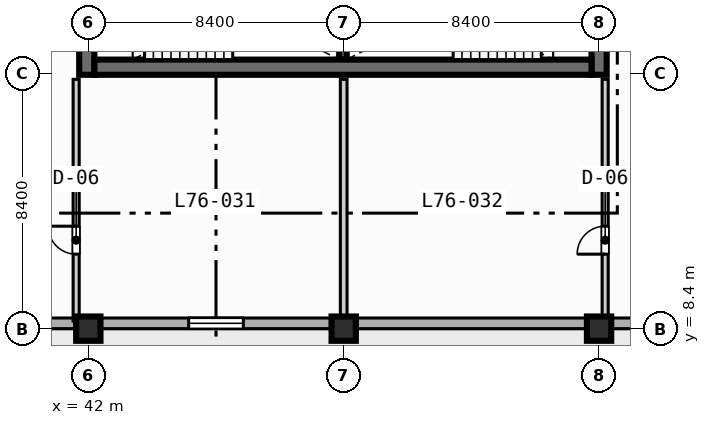
"""IFC4 building model, lengths in metres.
Left out: names, types, materials, properties, quantities, classifications, styles, units other than length and angle.
Written with IfcOpenShell. Run it as: python <this file> out.ifc"""

import sys

from ifc_helpers import new_model, si_unit, direction, frame, frame_2d, origin, origin_2d, place, context, subcontext, project, spatial, rectangle, extrude, element, fill, save


model = new_model("IFC4")
c1 = context("Model", 3, precision=1e-05, world=origin(), true_north=direction((0.0, 1.0)))
c2 = subcontext(c1, "Body", "Model", "MODEL_VIEW")
j1 = project(units=[si_unit("LENGTHUNIT", "METRE"), si_unit("PLANEANGLEUNIT", "RADIAN")], contexts=[c1])
p1 = place(None, origin())
s1 = spatial("IfcSite", under=j1, at=p1, CompositionType="ELEMENT")
p2 = place(p1, origin())
s2 = spatial("IfcBuilding", under=s1, at=p2, CompositionType="ELEMENT")
p3 = place(p2, frame((0.0, 0.0, 308.6)))
s3 = spatial("IfcBuildingStorey", under=s2, at=p3, CompositionType="ELEMENT", Elevation=308.6)
p4 = place(p3, frame((50.375, 17.25, 0.0), z_axis=(0.0, 0.0, 1.0), x_axis=(0.0, 1.0, 0.0)))
e1 = element("IfcWall", 1, at=p4, inside=s3, PredefinedType="SOLIDWALL", context=c2, shape_type="SweptSolid", body=[
    extrude(rectangle(XDim=3.5, YDim=0.25, at=frame_2d((1.75, 0.0))), origin(), (0.0, 0.0, 1.0), 3.67),
])
for number, where, z_axis, x_axis in (
    (2, (41.95, 16.75, 0.0), (0.0, 0.0, 1.0), (0.0, 1.0, 0.0)),
    (3, (58.8, 16.75, 0.0), (0.0, 0.0, 1.0), (0.0, 1.0, 0.0)),
):
    element("IfcWall", number, at=place(p3, frame(where, z_axis=z_axis, x_axis=x_axis)), inside=s3, PredefinedType="SHEAR", context=c2, shape_type="SweptSolid", body=[
        extrude(rectangle(XDim=1.25, YDim=0.5, at=frame_2d((0.625, 0.0))), origin(), (0.0, 0.0, 1.0), 3.67),
    ])
p5 = place(p3, frame((42.2, 17.0, 0.0), z_axis=(0.0, 0.0, 1.0), x_axis=(1.0, 0.0, 0.0)))
e4 = element("IfcWall", 4, at=p5, inside=s3, PredefinedType="SHEAR", context=c2, shape_type="SweptSolid", body=[
    extrude(rectangle(XDim=16.35, YDim=0.5, at=frame_2d((8.175, 0.0))), origin(), (0.0, 0.0, 1.0), 3.67),
])
for number, where, z_axis, x_axis in (
    (5, (42.0, 8.4, 0.0), (0.0, 0.0, 1.0), (1.0, 0.0, 0.0)),
    (6, (50.4, 8.4, 0.0), (0.0, 0.0, 1.0), (1.0, 0.0, 0.0)),
    (7, (58.8, 8.4, 0.0), (0.0, 0.0, 1.0), (1.0, 0.0, 0.0)),
):
    element("IfcColumn", number, at=place(p3, frame(where, z_axis=z_axis, x_axis=x_axis)), inside=s3, PredefinedType="COLUMN", context=c2, shape_type="SweptSolid", body=[
        extrude(rectangle(XDim=0.8, YDim=0.8, at=origin_2d()), origin(), (0.0, 0.0, 1.0), 3.9),
    ])
p6 = place(p3, frame((64.025, 8.575, 0.0), z_axis=(0.0, 0.0, 1.0), x_axis=(-1.0, 0.0, 0.0)))
e8 = element("IfcWall", 8, at=p6, inside=s3, PredefinedType="STANDARD", context=c2, shape_type="SweptSolid", body=[
    extrude(rectangle(XDim=52.45, YDim=0.35, at=frame_2d((26.225, 0.0))), origin(), (0.0, 0.0, 1.0), 3.67),
])
p7 = place(p6, frame((34.925, 0.0, 0.0)))
e9 = element("IfcOpeningElement", 9, at=p7, cuts=e8, PredefinedType="OPENING", context=c2, shape_type="SweptSolid", body=[
    extrude(rectangle(XDim=1.4, YDim=2.2, at=frame_2d((0.7, 1.1))), frame((0.0, 0.185, 0.0), z_axis=(0.0, -1.0, 0.0), x_axis=(1.0, 0.0, 0.0)), (0.0, 0.0, 1.0), 0.37),
])
p8 = place(p6, frame((25.025, 0.0, 0.85)))
e10 = element("IfcOpeningElement", 10, at=p8, cuts=e8, PredefinedType="OPENING", context=c2, shape_type="SweptSolid", body=[
    extrude(rectangle(XDim=2.4, YDim=1.95, at=frame_2d((1.2, 0.975))), frame((0.0, 0.185, 0.0), z_axis=(0.0, -1.0, 0.0), x_axis=(1.0, 0.0, 0.0)), (0.0, 0.0, 1.0), 0.37),
])
p9 = place(p6, frame((16.925, 0.0, 0.85)))
e11 = element("IfcOpeningElement", 11, at=p9, cuts=e8, PredefinedType="OPENING", context=c2, shape_type="SweptSolid", body=[
    extrude(rectangle(XDim=1.8, YDim=1.8, at=frame_2d((0.9, 0.9))), frame((0.0, 0.185, 0.0), z_axis=(0.0, -1.0, 0.0), x_axis=(1.0, 0.0, 0.0)), (0.0, 0.0, 1.0), 0.37),
])
p10 = place(p6, frame((47.925, 0.0, 0.85)))
e12 = element("IfcOpeningElement", 12, at=p10, cuts=e8, PredefinedType="OPENING", context=c2, shape_type="SweptSolid", body=[
    extrude(rectangle(XDim=1.8, YDim=1.8, at=frame_2d((0.9, 0.9))), frame((0.0, 0.185, 0.0), z_axis=(0.0, -1.0, 0.0), x_axis=(1.0, 0.0, 0.0)), (0.0, 0.0, 1.0), 0.37),
])
p11 = place(p3, frame((41.6, 8.65, 0.0), z_axis=(0.0, 0.0, 1.0), x_axis=(0.0, 1.0, 0.0)))
e13 = element("IfcWall", 13, at=p11, inside=s3, PredefinedType="PARTITIONING", context=c2, shape_type="SweptSolid", body=[
    extrude(rectangle(XDim=7.95, YDim=0.2, at=frame_2d((3.975, 0.0))), origin(), (0.0, 0.0, 1.0), 3.67),
])
p12 = place(p11, frame((2.2, 0.0, 0.0)))
e14 = element("IfcOpeningElement", 14, at=p12, cuts=e13, PredefinedType="OPENING", context=c2, shape_type="SweptSolid", body=[
    extrude(rectangle(XDim=0.92, YDim=2.1, at=frame_2d((0.46, 1.05))), frame((0.0, 0.11, 0.0), z_axis=(0.0, -1.0, 0.0), x_axis=(1.0, 0.0, 0.0)), (0.0, 0.0, 1.0), 0.22),
])
p13 = place(p3, frame((59.0, 8.65, 0.0), z_axis=(0.0, 0.0, 1.0), x_axis=(0.0, 1.0, 0.0)))
e15 = element("IfcWall", 15, at=p13, inside=s3, PredefinedType="PARTITIONING", context=c2, shape_type="SweptSolid", body=[
    extrude(rectangle(XDim=7.95, YDim=0.2, at=frame_2d((3.975, 0.0))), origin(), (0.0, 0.0, 1.0), 3.131),
])
p14 = place(p13, frame((2.2, 0.0, 0.0)))
e16 = element("IfcOpeningElement", 16, at=p14, cuts=e15, PredefinedType="OPENING", context=c2, shape_type="SweptSolid", body=[
    extrude(rectangle(XDim=0.92, YDim=2.1, at=frame_2d((0.46, 1.05))), frame((0.0, 0.11, 0.0), z_axis=(0.0, -1.0, 0.0), x_axis=(1.0, 0.0, 0.0)), (0.0, 0.0, 1.0), 0.22),
])
p15 = place(p3, frame((50.4, 8.65, 0.0), z_axis=(0.0, 0.0, 1.0), x_axis=(0.0, 1.0, 0.0)))
e17 = element("IfcWall", 17, at=p15, inside=s3, PredefinedType="PARTITIONING", context=c2, shape_type="SweptSolid", body=[
    extrude(rectangle(XDim=7.95, YDim=0.22, at=frame_2d((3.975, 0.0))), origin(), (0.0, 0.0, 1.0), 3.07),
])
p16 = place(p9, origin())
e18 = element("IfcWindow", 18, at=p16, inside=s3, PartitioningType="SINGLE_PANEL", PredefinedType="WINDOW", context=c2, shape_type="SweptSolid", body=[
    extrude(rectangle(XDim=1.8, YDim=1.8, at=frame_2d((0.9, 0.9))), frame((0.0, 0.03, 0.0), z_axis=(0.0, -1.0, 0.0), x_axis=(1.0, 0.0, 0.0)), (0.0, 0.0, 1.0), 0.06),
])
fill(e11, e18)
p17 = place(p12, origin())
e19 = element("IfcDoor", 19, at=p17, inside=s3, OperationType="SINGLE_SWING_RIGHT", PredefinedType="DOOR", context=c2, shape_type="SweptSolid", body=[
    extrude(rectangle(XDim=0.92, YDim=2.1, at=frame_2d((0.46, 1.05))), frame((0.0, 0.025, 0.0), z_axis=(0.0, -1.0, 0.0), x_axis=(1.0, 0.0, 0.0)), (0.0, 0.0, 1.0), 0.05),
])
fill(e14, e19)
p18 = place(p14, origin())
e20 = element("IfcDoor", 20, at=p18, inside=s3, OperationType="SINGLE_SWING_LEFT", PredefinedType="DOOR", context=c2, shape_type="SweptSolid", body=[
    extrude(rectangle(XDim=0.92, YDim=2.1, at=frame_2d((0.46, 1.05))), frame((0.0, 0.025, 0.0), z_axis=(0.0, -1.0, 0.0), x_axis=(1.0, 0.0, 0.0)), (0.0, 0.0, 1.0), 0.05),
])
fill(e16, e20)
save(model, sys.argv[1])
